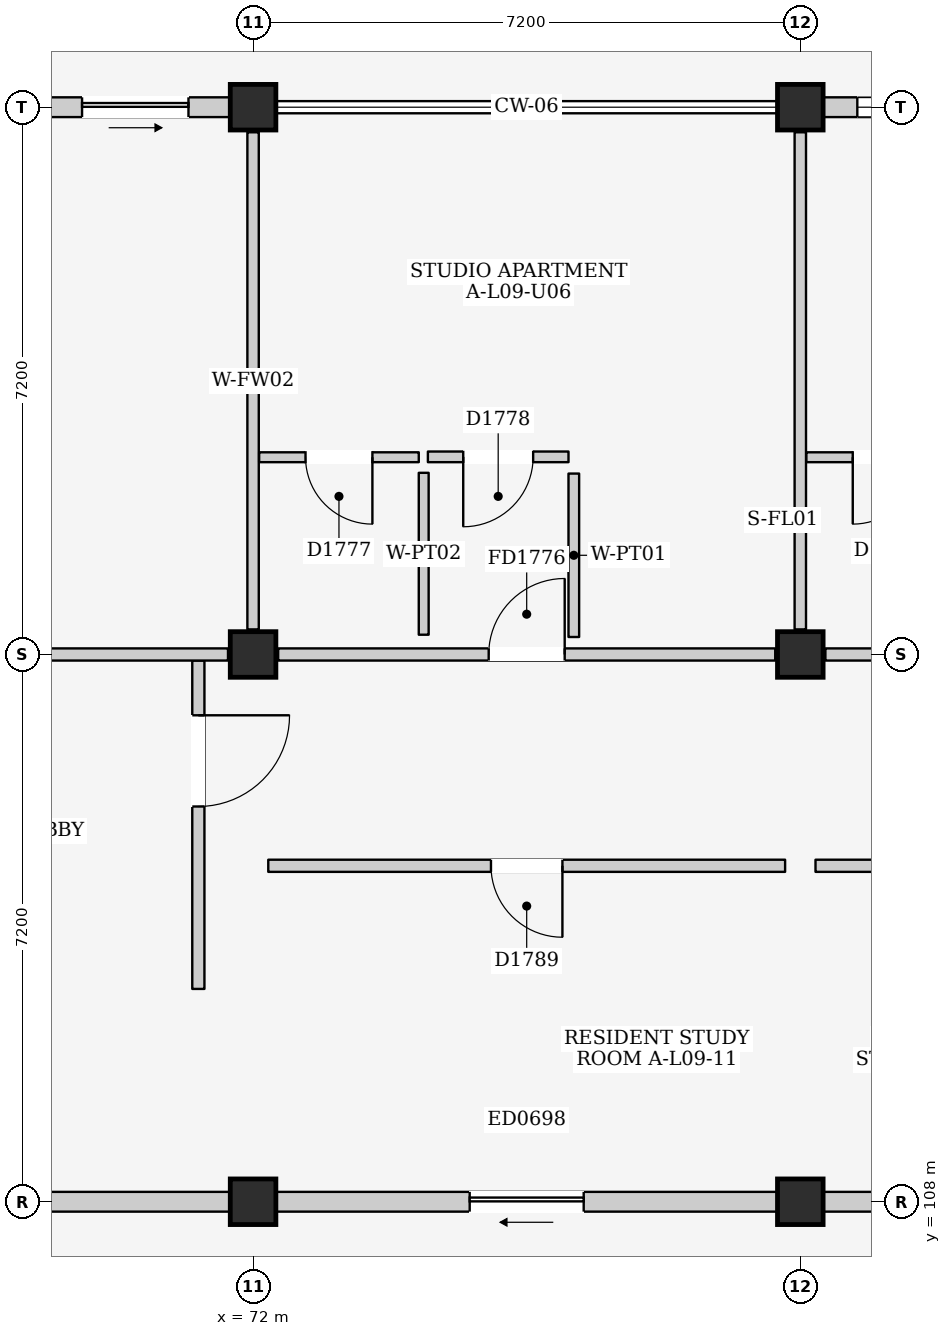
"""IFC4 building model, lengths in metres.
Left out: names, types, materials, properties, quantities, classifications, styles, units other than length and angle.
Written with IfcOpenShell. Run it as: python <this file> out.ifc"""

import sys

from ifc_helpers import new_model, si_unit, direction, frame, frame_2d, origin, origin_2d, place, context, subcontext, project, spatial, rectangle, extrude, element, fill, save


model = new_model("IFC4")
c1 = context("Model", 3, precision=1e-05, world=origin(), true_north=direction((0.0, 1.0)))
c2 = subcontext(c1, "Body", "Model", "MODEL_VIEW")
j1 = project(units=[si_unit("LENGTHUNIT", "METRE"), si_unit("PLANEANGLEUNIT", "RADIAN")], contexts=[c1])
p1 = place(None, origin())
s1 = spatial("IfcSite", under=j1, at=p1, CompositionType="ELEMENT")
p2 = place(p1, origin())
s2 = spatial("IfcBuilding", under=s1, at=p2, CompositionType="ELEMENT")
p3 = place(p2, frame((0.0, 0.0, 31.5)))
s3 = spatial("IfcBuildingStorey", under=s2, at=p3, CompositionType="ELEMENT", Elevation=31.5)
for number, where, z_axis, x_axis in (
    (1, (72.0, 108.0, 0.0), (0.0, 0.0, 1.0), (1.0, 0.0, 0.0)),
    (2, (72.0, 115.2, 0.0), (0.0, 0.0, 1.0), (1.0, 0.0, 0.0)),
    (3, (72.0, 122.4, 0.0), (0.0, 0.0, 1.0), (1.0, 0.0, 0.0)),
    (4, (79.2, 108.0, 0.0), (0.0, 0.0, 1.0), (1.0, 0.0, 0.0)),
    (5, (79.2, 115.2, 0.0), (0.0, 0.0, 1.0), (1.0, 0.0, 0.0)),
    (6, (79.2, 122.4, 0.0), (0.0, 0.0, 1.0), (1.0, 0.0, 0.0)),
):
    element("IfcColumn", number, at=place(p3, frame(where, z_axis=z_axis, x_axis=x_axis)), inside=s3, PredefinedType="COLUMN", context=c2, shape_type="SweptSolid", body=[
        extrude(rectangle(XDim=0.6, YDim=0.6, at=origin_2d()), origin(), (0.0, 0.0, 1.0), 3.3),
    ])
p4 = place(p3, frame((65.1, 122.4, 0.0), z_axis=(0.0, 0.0, 1.0), x_axis=(1.0, 0.0, 0.0)))
e7 = element("IfcWall", 7, at=p4, inside=s3, PredefinedType="ELEMENTEDWALL", context=c2, shape_type="SweptSolid", body=[
    extrude(rectangle(XDim=6.6, YDim=0.26, at=frame_2d((3.3, 0.0))), origin(), (0.0, 0.0, 1.0), 2.615),
])
p5 = place(p4, frame((4.65, 0.0, 0.0)))
e8 = element("IfcOpeningElement", 8, at=p5, cuts=e7, PredefinedType="OPENING", context=c2, shape_type="SweptSolid", body=[
    extrude(rectangle(XDim=1.4, YDim=2.1, at=frame_2d((0.7, 1.05))), frame((0.0, 0.145, 0.0), z_axis=(0.0, -1.0, 0.0), x_axis=(1.0, 0.0, 0.0)), (0.0, 0.0, 1.0), 0.29),
])
p6 = place(p4, frame((0.45, 0.0, 0.9)))
e9 = element("IfcOpeningElement", 9, at=p6, cuts=e7, PredefinedType="OPENING", context=c2, shape_type="SweptSolid", body=[
    extrude(rectangle(XDim=1.3, YDim=1.25, at=frame_2d((0.65, 0.625))), frame((0.0, 0.145, 0.0), z_axis=(0.0, -1.0, 0.0), x_axis=(1.0, 0.0, 0.0)), (0.0, 0.0, 1.0), 0.29),
])
p7 = place(p3, frame((65.1, 108.0, 0.0), z_axis=(0.0, 0.0, 1.0), x_axis=(1.0, 0.0, 0.0)))
e10 = element("IfcWall", 10, at=p7, inside=s3, PredefinedType="ELEMENTEDWALL", context=c2, shape_type="SweptSolid", body=[
    extrude(rectangle(XDim=6.6, YDim=0.26, at=frame_2d((3.3, 0.0))), origin(), (0.0, 0.0, 1.0), 2.415),
])
p8 = place(p7, frame((2.8, 0.0, 1.2)))
e11 = element("IfcOpeningElement", 11, at=p8, cuts=e10, PredefinedType="OPENING", context=c2, shape_type="SweptSolid", body=[
    extrude(rectangle(XDim=1.0, YDim=0.9, at=frame_2d((0.5, 0.45))), frame((0.0, 0.145, 0.0), z_axis=(0.0, -1.0, 0.0), x_axis=(1.0, 0.0, 0.0)), (0.0, 0.0, 1.0), 0.29),
])
p9 = place(p3, frame((72.3, 108.0, 0.0), z_axis=(0.0, 0.0, 1.0), x_axis=(1.0, 0.0, 0.0)))
e12 = element("IfcWall", 12, at=p9, inside=s3, PredefinedType="ELEMENTEDWALL", context=c2, shape_type="SweptSolid", body=[
    extrude(rectangle(XDim=6.6, YDim=0.26, at=frame_2d((3.3, 0.0))), origin(), (0.0, 0.0, 1.0), 2.415),
])
p10 = place(p9, frame((2.55, 0.0, 0.0)))
e13 = element("IfcOpeningElement", 13, at=p10, cuts=e12, PredefinedType="OPENING", context=c2, shape_type="SweptSolid", body=[
    extrude(rectangle(XDim=1.5, YDim=2.12, at=frame_2d((0.75, 1.06))), frame((0.0, 0.145, 0.0), z_axis=(0.0, -1.0, 0.0), x_axis=(1.0, 0.0, 0.0)), (0.0, 0.0, 1.0), 0.29),
])
p11 = place(p3, frame((79.5, 122.4, 0.0), z_axis=(0.0, 0.0, 1.0), x_axis=(1.0, 0.0, 0.0)))
e14 = element("IfcWall", 14, at=p11, inside=s3, PredefinedType="ELEMENTEDWALL", context=c2, shape_type="SweptSolid", body=[
    extrude(rectangle(XDim=6.6, YDim=0.26, at=frame_2d((3.3, 0.0))), origin(), (0.0, 0.0, 1.0), 2.615),
])
p12 = place(p11, frame((4.45, 0.0, 0.0)))
e15 = element("IfcOpeningElement", 15, at=p12, cuts=e14, PredefinedType="OPENING", context=c2, shape_type="SweptSolid", body=[
    extrude(rectangle(XDim=1.6, YDim=2.12, at=frame_2d((0.8, 1.06))), frame((0.0, 0.145, 0.0), z_axis=(0.0, -1.0, 0.0), x_axis=(1.0, 0.0, 0.0)), (0.0, 0.0, 1.0), 0.29),
])
p13 = place(p11, frame((0.45, 0.0, 0.9)))
e16 = element("IfcOpeningElement", 16, at=p13, cuts=e14, PredefinedType="OPENING", context=c2, shape_type="SweptSolid", body=[
    extrude(rectangle(XDim=1.75, YDim=1.55, at=frame_2d((0.875, 0.775))), frame((0.0, 0.145, 0.0), z_axis=(0.0, -1.0, 0.0), x_axis=(1.0, 0.0, 0.0)), (0.0, 0.0, 1.0), 0.29),
])
p14 = place(p3, frame((79.5, 108.0, 0.0), z_axis=(0.0, 0.0, 1.0), x_axis=(1.0, 0.0, 0.0)))
e17 = element("IfcWall", 17, at=p14, inside=s3, PredefinedType="ELEMENTEDWALL", context=c2, shape_type="SweptSolid", body=[
    extrude(rectangle(XDim=6.6, YDim=0.26, at=frame_2d((3.3, 0.0))), origin(), (0.0, 0.0, 1.0), 2.415),
])
p15 = place(p14, frame((2.55, 0.0, 0.0)))
e18 = element("IfcOpeningElement", 18, at=p15, cuts=e17, PredefinedType="OPENING", context=c2, shape_type="SweptSolid", body=[
    extrude(rectangle(XDim=1.5, YDim=2.12, at=frame_2d((0.75, 1.06))), frame((0.0, 0.145, 0.0), z_axis=(0.0, -1.0, 0.0), x_axis=(1.0, 0.0, 0.0)), (0.0, 0.0, 1.0), 0.29),
])
p16 = place(p3, frame((71.28, 110.8, 0.0), z_axis=(0.0, 0.0, 1.0), x_axis=(0.0, 1.0, 0.0)))
e19 = element("IfcWall", 19, at=p16, inside=s3, PredefinedType="PARTITIONING", context=c2, shape_type="SweptSolid", body=[
    extrude(rectangle(XDim=4.32, YDim=0.16, at=frame_2d((2.16, 0.0))), origin(), (0.0, 0.0, 1.0), 3.08),
])
p17 = place(p16, frame((2.4, 0.0, 0.0)))
e20 = element("IfcOpeningElement", 20, at=p17, cuts=e19, PredefinedType="OPENING", context=c2, shape_type="SweptSolid", body=[
    extrude(rectangle(XDim=1.2, YDim=2.2, at=frame_2d((0.6, 1.1))), frame((0.0, 0.095, 0.0), z_axis=(0.0, -1.0, 0.0), x_axis=(1.0, 0.0, 0.0)), (0.0, 0.0, 1.0), 0.19),
])
p18 = place(p3, frame((65.13, 115.2, 0.0), z_axis=(0.0, 0.0, 1.0), x_axis=(1.0, 0.0, 0.0)))
e21 = element("IfcWall", 21, at=p18, inside=s3, PredefinedType="PARTITIONING", context=c2, shape_type="SweptSolid", body=[
    extrude(rectangle(XDim=6.54, YDim=0.16, at=frame_2d((3.27, 0.0))), origin(), (0.0, 0.0, 1.0), 2.415),
])
p19 = place(p18, frame((2.77, 0.0, 0.0)))
e22 = element("IfcOpeningElement", 22, at=p19, cuts=e21, PredefinedType="OPENING", context=c2, shape_type="SweptSolid", body=[
    extrude(rectangle(XDim=1.0, YDim=2.15, at=frame_2d((0.5, 1.075))), frame((0.0, 0.095, 0.0), z_axis=(0.0, -1.0, 0.0), x_axis=(1.0, 0.0, 0.0)), (0.0, 0.0, 1.0), 0.19),
])
p20 = place(p3, frame((72.0, 115.53, 0.0), z_axis=(0.0, 0.0, 1.0), x_axis=(0.0, 1.0, 0.0)))
e23 = element("IfcWall", 23, at=p20, inside=s3, PredefinedType="PARTITIONING", context=c2, shape_type="SweptSolid", body=[
    extrude(rectangle(XDim=6.54, YDim=0.15, at=frame_2d((3.27, 0.0))), origin(), (0.0, 0.0, 1.0), 2.565),
])
p21 = place(p3, frame((72.33, 115.2, 0.0), z_axis=(0.0, 0.0, 1.0), x_axis=(1.0, 0.0, 0.0)))
e24 = element("IfcWall", 24, at=p21, inside=s3, PredefinedType="PARTITIONING", context=c2, shape_type="SweptSolid", body=[
    extrude(rectangle(XDim=6.54, YDim=0.16, at=frame_2d((3.27, 0.0))), origin(), (0.0, 0.0, 1.0), 2.415),
])
p22 = place(p21, frame((2.77, 0.0, 0.0)))
e25 = element("IfcOpeningElement", 25, at=p22, cuts=e24, PredefinedType="OPENING", context=c2, shape_type="SweptSolid", body=[
    extrude(rectangle(XDim=1.0, YDim=2.15, at=frame_2d((0.5, 1.075))), frame((0.0, 0.095, 0.0), z_axis=(0.0, -1.0, 0.0), x_axis=(1.0, 0.0, 0.0)), (0.0, 0.0, 1.0), 0.19),
])
p23 = place(p3, frame((79.2, 115.53, 0.0), z_axis=(0.0, 0.0, 1.0), x_axis=(0.0, 1.0, 0.0)))
e26 = element("IfcWall", 26, at=p23, inside=s3, PredefinedType="PARTITIONING", context=c2, shape_type="SweptSolid", body=[
    extrude(rectangle(XDim=6.54, YDim=0.15, at=frame_2d((3.27, 0.0))), origin(), (0.0, 0.0, 1.0), 2.565),
])
p24 = place(p3, frame((72.08, 117.795, 0.0), z_axis=(0.0, 0.0, 1.0), x_axis=(1.0, 0.0, 0.0)))
e27 = element("IfcWall", 27, at=p24, inside=s3, PredefinedType="PARTITIONING", context=c2, shape_type="SweptSolid", body=[
    extrude(rectangle(XDim=2.1, YDim=0.13, at=frame_2d((1.05, 0.0))), origin(), (0.0, 0.0, 1.0), 3.08),
])
p25 = place(p24, frame((0.61, 0.0, 0.0)))
e28 = element("IfcOpeningElement", 28, at=p25, cuts=e27, PredefinedType="OPENING", context=c2, shape_type="SweptSolid", body=[
    extrude(rectangle(XDim=0.88, YDim=2.1, at=frame_2d((0.44, 1.05))), frame((0.0, 0.08, 0.0), z_axis=(0.0, -1.0, 0.0), x_axis=(1.0, 0.0, 0.0)), (0.0, 0.0, 1.0), 0.16),
])
p26 = place(p3, frame((74.245, 115.46, 0.0), z_axis=(0.0, 0.0, 1.0), x_axis=(0.0, 1.0, 0.0)))
e29 = element("IfcWall", 29, at=p26, inside=s3, PredefinedType="PARTITIONING", context=c2, shape_type="SweptSolid", body=[
    extrude(rectangle(XDim=2.13, YDim=0.13, at=frame_2d((1.065, 0.0))), origin(), (0.0, 0.0, 1.0), 3.08),
])
p27 = place(p3, frame((74.3, 117.8, 0.0), z_axis=(0.0, 0.0, 1.0), x_axis=(1.0, 0.0, 0.0)))
e30 = element("IfcWall", 30, at=p27, inside=s3, PredefinedType="PARTITIONING", context=c2, shape_type="SweptSolid", body=[
    extrude(rectangle(XDim=1.85, YDim=0.14, at=frame_2d((0.925, 0.0))), origin(), (0.0, 0.0, 1.0), 3.08),
])
p28 = place(p27, frame((0.465, 0.0, 0.0)))
e31 = element("IfcOpeningElement", 31, at=p28, cuts=e30, PredefinedType="OPENING", context=c2, shape_type="SweptSolid", body=[
    extrude(rectangle(XDim=0.92, YDim=2.1, at=frame_2d((0.46, 1.05))), frame((0.0, 0.085, 0.0), z_axis=(0.0, -1.0, 0.0), x_axis=(1.0, 0.0, 0.0)), (0.0, 0.0, 1.0), 0.17),
])
p29 = place(p3, frame((76.22, 115.43, 0.0), z_axis=(0.0, 0.0, 1.0), x_axis=(0.0, 1.0, 0.0)))
e32 = element("IfcWall", 32, at=p29, inside=s3, PredefinedType="PARTITIONING", context=c2, shape_type="SweptSolid", body=[
    extrude(rectangle(XDim=2.15, YDim=0.14, at=frame_2d((1.075, 0.0))), origin(), (0.0, 0.0, 1.0), 3.08),
])
p30 = place(p3, frame((79.53, 115.2, 0.0), z_axis=(0.0, 0.0, 1.0), x_axis=(1.0, 0.0, 0.0)))
e33 = element("IfcWall", 33, at=p30, inside=s3, PredefinedType="PARTITIONING", context=c2, shape_type="SweptSolid", body=[
    extrude(rectangle(XDim=6.54, YDim=0.16, at=frame_2d((3.27, 0.0))), origin(), (0.0, 0.0, 1.0), 2.415),
])
p31 = place(p30, frame((2.77, 0.0, 0.0)))
e34 = element("IfcOpeningElement", 34, at=p31, cuts=e33, PredefinedType="OPENING", context=c2, shape_type="SweptSolid", body=[
    extrude(rectangle(XDim=1.0, YDim=2.15, at=frame_2d((0.5, 1.075))), frame((0.0, 0.095, 0.0), z_axis=(0.0, -1.0, 0.0), x_axis=(1.0, 0.0, 0.0)), (0.0, 0.0, 1.0), 0.19),
])
p32 = place(p3, frame((79.28, 117.795, 0.0), z_axis=(0.0, 0.0, 1.0), x_axis=(1.0, 0.0, 0.0)))
e35 = element("IfcWall", 35, at=p32, inside=s3, PredefinedType="PARTITIONING", context=c2, shape_type="SweptSolid", body=[
    extrude(rectangle(XDim=2.1, YDim=0.13, at=frame_2d((1.05, 0.0))), origin(), (0.0, 0.0, 1.0), 3.08),
])
p33 = place(p32, frame((0.61, 0.0, 0.0)))
e36 = element("IfcOpeningElement", 36, at=p33, cuts=e35, PredefinedType="OPENING", context=c2, shape_type="SweptSolid", body=[
    extrude(rectangle(XDim=0.88, YDim=2.1, at=frame_2d((0.44, 1.05))), frame((0.0, 0.08, 0.0), z_axis=(0.0, -1.0, 0.0), x_axis=(1.0, 0.0, 0.0)), (0.0, 0.0, 1.0), 0.16),
])
p34 = place(p3, frame((72.2, 112.42, 0.0), z_axis=(0.0, 0.0, 1.0), x_axis=(1.0, 0.0, 0.0)))
e37 = element("IfcWall", 37, at=p34, inside=s3, PredefinedType="PARTITIONING", context=c2, shape_type="SweptSolid", body=[
    extrude(rectangle(XDim=6.8, YDim=0.16, at=frame_2d((3.4, 0.0))), origin(), (0.0, 0.0, 1.0), 3.08),
])
p35 = place(p34, frame((2.93, 0.0, 0.0)))
e38 = element("IfcOpeningElement", 38, at=p35, cuts=e37, PredefinedType="OPENING", context=c2, shape_type="SweptSolid", body=[
    extrude(rectangle(XDim=0.94, YDim=2.12, at=frame_2d((0.47, 1.06))), frame((0.0, 0.095, 0.0), z_axis=(0.0, -1.0, 0.0), x_axis=(1.0, 0.0, 0.0)), (0.0, 0.0, 1.0), 0.19),
])
p36 = place(p3, frame((79.4, 112.42, 0.0), z_axis=(0.0, 0.0, 1.0), x_axis=(1.0, 0.0, 0.0)))
e39 = element("IfcWall", 39, at=p36, inside=s3, PredefinedType="PARTITIONING", context=c2, shape_type="SweptSolid", body=[
    extrude(rectangle(XDim=6.8, YDim=0.16, at=frame_2d((3.4, 0.0))), origin(), (0.0, 0.0, 1.0), 3.08),
])
p37 = place(p36, frame((2.93, 0.0, 0.0)))
e40 = element("IfcOpeningElement", 40, at=p37, cuts=e39, PredefinedType="OPENING", context=c2, shape_type="SweptSolid", body=[
    extrude(rectangle(XDim=0.94, YDim=2.12, at=frame_2d((0.47, 1.06))), frame((0.0, 0.095, 0.0), z_axis=(0.0, -1.0, 0.0), x_axis=(1.0, 0.0, 0.0)), (0.0, 0.0, 1.0), 0.19),
])
p38 = place(p5, frame((1.4, 0.0, 0.0), z_axis=(0.0, 0.0, 1.0), x_axis=(-1.0, 0.0, 0.0)))
e41 = element("IfcDoor", 41, at=p38, inside=s3, OperationType="SLIDING_TO_RIGHT", PredefinedType="DOOR", context=c2, shape_type="SweptSolid", body=[
    extrude(rectangle(XDim=1.4, YDim=2.1, at=frame_2d((0.7, 1.05))), frame((0.0, 0.025, 0.0), z_axis=(0.0, -1.0, 0.0), x_axis=(1.0, 0.0, 0.0)), (0.0, 0.0, 1.0), 0.05),
])
fill(e8, e41)
p39 = place(p10, frame((1.5, 0.0, 0.0), z_axis=(0.0, 0.0, 1.0), x_axis=(-1.0, 0.0, 0.0)))
e42 = element("IfcDoor", 42, at=p39, inside=s3, OperationType="SLIDING_TO_LEFT", PredefinedType="DOOR", context=c2, shape_type="SweptSolid", body=[
    extrude(rectangle(XDim=1.5, YDim=2.12, at=frame_2d((0.75, 1.06))), frame((0.0, 0.025, 0.0), z_axis=(0.0, -1.0, 0.0), x_axis=(1.0, 0.0, 0.0)), (0.0, 0.0, 1.0), 0.05),
])
fill(e13, e42)
p40 = place(p13, origin())
e43 = element("IfcWindow", 43, at=p40, inside=s3, PartitioningType="DOUBLE_PANEL_VERTICAL", PredefinedType="WINDOW", context=c2, shape_type="SweptSolid", body=[
    extrude(rectangle(XDim=1.75, YDim=1.55, at=frame_2d((0.875, 0.775))), frame((0.0, 0.03, 0.0), z_axis=(0.0, -1.0, 0.0), x_axis=(1.0, 0.0, 0.0)), (0.0, 0.0, 1.0), 0.06),
])
fill(e16, e43)
p41 = place(p17, frame((1.2, 0.0, 0.0), z_axis=(0.0, 0.0, 1.0), x_axis=(-1.0, 0.0, 0.0)))
e44 = element("IfcDoor", 44, at=p41, inside=s3, OperationType="SINGLE_SWING_LEFT", PredefinedType="DOOR", context=c2, shape_type="SweptSolid", body=[
    extrude(rectangle(XDim=1.2, YDim=2.2, at=frame_2d((0.6, 1.1))), frame((0.0, 0.025, 0.0), z_axis=(0.0, -1.0, 0.0), x_axis=(1.0, 0.0, 0.0)), (0.0, 0.0, 1.0), 0.05),
])
fill(e20, e44)
p42 = place(p22, origin())
e45 = element("IfcDoor", 45, at=p42, inside=s3, OperationType="SINGLE_SWING_RIGHT", PredefinedType="DOOR", context=c2, shape_type="SweptSolid", body=[
    extrude(rectangle(XDim=1.0, YDim=2.15, at=frame_2d((0.5, 1.075))), frame((0.0, 0.025, 0.0), z_axis=(0.0, -1.0, 0.0), x_axis=(1.0, 0.0, 0.0)), (0.0, 0.0, 1.0), 0.05),
])
fill(e25, e45)
p43 = place(p25, frame((0.88, 0.0, 0.0), z_axis=(0.0, 0.0, 1.0), x_axis=(-1.0, 0.0, 0.0)))
e46 = element("IfcDoor", 46, at=p43, inside=s3, OperationType="SINGLE_SWING_LEFT", PredefinedType="DOOR", context=c2, shape_type="SweptSolid", body=[
    extrude(rectangle(XDim=0.88, YDim=2.1, at=frame_2d((0.44, 1.05))), frame((0.0, 0.025, 0.0), z_axis=(0.0, -1.0, 0.0), x_axis=(1.0, 0.0, 0.0)), (0.0, 0.0, 1.0), 0.05),
])
fill(e28, e46)
p44 = place(p28, frame((0.92, 0.0, 0.0), z_axis=(0.0, 0.0, 1.0), x_axis=(-1.0, 0.0, 0.0)))
e47 = element("IfcDoor", 47, at=p44, inside=s3, OperationType="SINGLE_SWING_RIGHT", PredefinedType="DOOR", context=c2, shape_type="SweptSolid", body=[
    extrude(rectangle(XDim=0.92, YDim=2.1, at=frame_2d((0.46, 1.05))), frame((0.0, 0.025, 0.0), z_axis=(0.0, -1.0, 0.0), x_axis=(1.0, 0.0, 0.0)), (0.0, 0.0, 1.0), 0.05),
])
fill(e31, e47)
p45 = place(p33, frame((0.88, 0.0, 0.0), z_axis=(0.0, 0.0, 1.0), x_axis=(-1.0, 0.0, 0.0)))
e48 = element("IfcDoor", 48, at=p45, inside=s3, OperationType="SINGLE_SWING_RIGHT", PredefinedType="DOOR", context=c2, shape_type="SweptSolid", body=[
    extrude(rectangle(XDim=0.88, YDim=2.1, at=frame_2d((0.44, 1.05))), frame((0.0, 0.025, 0.0), z_axis=(0.0, -1.0, 0.0), x_axis=(1.0, 0.0, 0.0)), (0.0, 0.0, 1.0), 0.05),
])
fill(e36, e48)
p46 = place(p35, frame((0.94, 0.0, 0.0), z_axis=(0.0, 0.0, 1.0), x_axis=(-1.0, 0.0, 0.0)))
e49 = element("IfcDoor", 49, at=p46, inside=s3, OperationType="SINGLE_SWING_LEFT", PredefinedType="DOOR", context=c2, shape_type="SweptSolid", body=[
    extrude(rectangle(XDim=0.94, YDim=2.12, at=frame_2d((0.47, 1.06))), frame((0.0, 0.025, 0.0), z_axis=(0.0, -1.0, 0.0), x_axis=(1.0, 0.0, 0.0)), (0.0, 0.0, 1.0), 0.05),
])
fill(e38, e49)
save(model, sys.argv[1])
